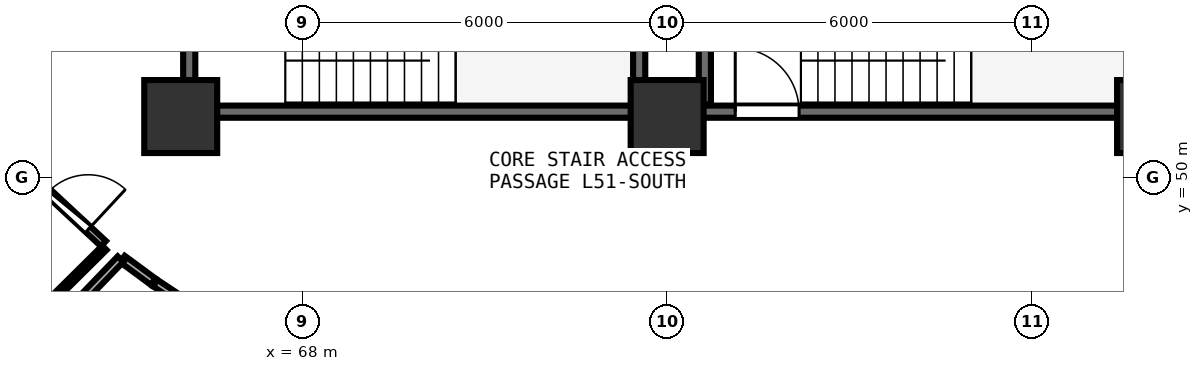
"""IFC4 building model, lengths in metres.
Left out: names, types, materials, properties, quantities, classifications, styles, units other than length and angle.
Written with IfcOpenShell. Run it as: python <this file> out.ifc"""

import sys

from ifc_helpers import new_model, si_unit, direction, frame, frame_2d, origin, origin_2d, place, context, subcontext, project, spatial, rectangle, extrude, element, fill, save


model = new_model("IFC4")
c1 = context("Model", 3, precision=1e-05, world=origin(), true_north=direction((0.0, 1.0)))
c2 = subcontext(c1, "Body", "Model", "MODEL_VIEW")
j1 = project(units=[si_unit("LENGTHUNIT", "METRE"), si_unit("PLANEANGLEUNIT", "RADIAN")], contexts=[c1])
p1 = place(None, origin())
s1 = spatial("IfcSite", under=j1, at=p1, CompositionType="ELEMENT")
p2 = place(p1, origin())
s2 = spatial("IfcBuilding", under=s1, at=p2, CompositionType="ELEMENT")
p3 = place(p2, frame((0.0, 0.0, 200.7)))
s3 = spatial("IfcBuildingStorey", under=s2, at=p3, CompositionType="ELEMENT", Elevation=200.7)
for number, where, z_axis, x_axis in (
    (1, (66.0, 51.0, 0.0), (0.0, 0.0, 1.0), (1.0, 0.0, 0.0)),
    (2, (74.0, 51.0, 0.0), (0.0, 0.0, 1.0), (1.0, 0.0, 0.0)),
    (3, (82.0, 51.0, 0.0), (0.0, 0.0, 1.0), (1.0, 0.0, 0.0)),
):
    element("IfcColumn", number, at=place(p3, frame(where, z_axis=z_axis, x_axis=x_axis)), inside=s3, PredefinedType="PILASTER", context=c2, shape_type="SweptSolid", body=[
        extrude(rectangle(XDim=1.2, YDim=1.2, at=origin_2d()), origin(), (0.0, 0.0, 1.0), 3.75),
    ])
p4 = place(p3, frame((74.0, 51.08, 0.0), z_axis=(0.0, 0.0, 1.0), x_axis=(1.0, 0.0, 0.0)))
e4 = element("IfcWall", 4, at=p4, inside=s3, PredefinedType="SHEAR", context=c2, shape_type="SweptSolid", body=[
    extrude(rectangle(XDim=7.9, YDim=0.2, at=frame_2d((3.95, 0.0))), origin(), (0.0, 0.0, 1.0), 3.49),
])
p5 = place(p4, frame((1.12, 0.0, 0.0)))
e5 = element("IfcOpeningElement", 5, at=p5, cuts=e4, PredefinedType="OPENING", context=c2, shape_type="SweptSolid", body=[
    extrude(rectangle(XDim=1.05, YDim=2.1, at=frame_2d((0.525, 1.05))), frame((0.0, 0.11, 0.0), z_axis=(0.0, -1.0, 0.0), x_axis=(1.0, 0.0, 0.0)), (0.0, 0.0, 1.0), 0.22),
])
p6 = place(p3, frame((74.62, 54.27, 0.0), z_axis=(0.0, 0.0, 1.0), x_axis=(0.0, -1.0, 0.0)))
e6 = element("IfcWall", 6, at=p6, inside=s3, PredefinedType="SHEAR", context=c2, shape_type="SweptSolid", body=[
    extrude(rectangle(XDim=3.07, YDim=0.2, at=frame_2d((1.535, 0.0))), origin(), (0.0, 0.0, 1.0), 3.49),
])
p7 = place(p3, frame((66.26, 51.08, 0.0), z_axis=(0.0, 0.0, 1.0), x_axis=(1.0, 0.0, 0.0)))
e7 = element("IfcWall", 7, at=p7, inside=s3, PredefinedType="SHEAR", context=c2, shape_type="SweptSolid", body=[
    extrude(rectangle(XDim=7.16, YDim=0.2, at=frame_2d((3.58, 0.0))), origin(), (0.0, 0.0, 1.0), 3.49),
])
p8 = place(p3, frame((73.54, 51.2, 0.0), z_axis=(0.0, 0.0, 1.0), x_axis=(0.0, 1.0, 0.0)))
e8 = element("IfcWall", 8, at=p8, inside=s3, PredefinedType="SHEAR", context=c2, shape_type="SweptSolid", body=[
    extrude(rectangle(XDim=3.07, YDim=0.2, at=frame_2d((1.535, 0.0))), origin(), (0.0, 0.0, 1.0), 3.49),
])
p9 = place(p3, frame((66.14, 54.27, 0.0), z_axis=(0.0, 0.0, 1.0), x_axis=(0.0, -1.0, 0.0)))
e9 = element("IfcWall", 9, at=p9, inside=s3, PredefinedType="SHEAR", context=c2, shape_type="SweptSolid", body=[
    extrude(rectangle(XDim=3.07, YDim=0.2, at=frame_2d((1.535, 0.0))), origin(), (0.0, 0.0, 1.0), 3.49),
])
p10 = place(p9, frame((1.01, 0.0, 0.0)))
e10 = element("IfcOpeningElement", 10, at=p10, cuts=e9, PredefinedType="OPENING", context=c2, shape_type="SweptSolid", body=[
    extrude(rectangle(XDim=1.05, YDim=2.1, at=frame_2d((0.525, 1.05))), frame((0.0, 0.11, 0.0), z_axis=(0.0, -1.0, 0.0), x_axis=(1.0, 0.0, 0.0)), (0.0, 0.0, 1.0), 0.22),
])
p11 = place(p3, frame((63.569, 49.988, 0.0), z_axis=(0.0, 0.0, 1.0), x_axis=(0.732453034456, -0.680817561698, 0.0)))
e11 = element("IfcWall", 11, at=p11, inside=s3, PredefinedType="PARTITIONING", context=c2, shape_type="SweptSolid", body=[
    extrude(rectangle(XDim=1.584, YDim=0.12, at=frame_2d((0.792, 0.0))), origin(), (0.0, 0.0, 1.0), 3.025),
])
p12 = place(p11, frame((0.342, 0.0, 0.0)))
e12 = element("IfcOpeningElement", 12, at=p12, cuts=e11, PredefinedType="OPENING", context=c2, shape_type="SweptSolid", body=[
    extrude(rectangle(XDim=0.9, YDim=2.08, at=frame_2d((0.45, 1.04))), frame((0.0, 0.07, 0.0), z_axis=(0.0, -1.0, 0.0), x_axis=(1.0, 0.0, 0.0)), (0.0, 0.0, 1.0), 0.14),
])
p13 = place(p3, frame((75.686, 45.773, 0.0), z_axis=(0.0, 0.0, 1.0), x_axis=(0.935263689731, 0.353951734945, 0.0)))
e13 = element("IfcWall", 13, at=p13, inside=s3, PredefinedType="PARTITIONING", context=c2, shape_type="SweptSolid", body=[
    extrude(rectangle(XDim=7.355, YDim=0.1, at=frame_2d((3.678, 0.0))), origin(), (0.0, 0.0, 1.0), 3.025),
])
p14 = place(p3, frame((64.745, 48.841, 0.0), z_axis=(0.0, 0.0, 1.0), x_axis=(-0.710363664194, -0.703834827635, 0.0)))
e14 = element("IfcWall", 14, at=p14, inside=s3, PredefinedType="PARTITIONING", context=c2, shape_type="SweptSolid", body=[
    extrude(rectangle(XDim=7.441, YDim=0.1, at=frame_2d((3.721, 0.0))), origin(), (0.0, 0.0, 1.0), 3.075),
])
p15 = place(p3, frame((65.04, 48.658, 0.0), z_axis=(0.0, 0.0, 1.0), x_axis=(0.804987739936, -0.593291444867, 0.0)))
e15 = element("IfcWall", 15, at=p15, inside=s3, PredefinedType="PLUMBINGWALL", context=c2, shape_type="SweptSolid", body=[
    extrude(rectangle(XDim=0.631, YDim=0.13, at=frame_2d((0.315, 0.0))), origin(), (0.0, 0.0, 1.0), 3.025),
])
p16 = place(p3, frame((65.581, 48.261, 0.0), z_axis=(0.0, 0.0, 1.0), x_axis=(0.83341242139, -0.55265155014, 0.0)))
e16 = element("IfcWall", 16, at=p16, inside=s3, PredefinedType="PLUMBINGWALL", context=c2, shape_type="SweptSolid", body=[
    extrude(rectangle(XDim=0.633, YDim=0.13, at=frame_2d((0.316, 0.0))), origin(), (0.0, 0.0, 1.0), 3.48),
])
p17 = place(p3, frame((62.465, 46.01, 0.0), z_axis=(0.0, 0.0, 1.0), x_axis=(0.693241598237, 0.720705270186, 0.0)))
e17 = element("IfcWall", 17, at=p17, inside=s3, PredefinedType="PLUMBINGWALL", context=c2, shape_type="SweptSolid", body=[
    extrude(rectangle(XDim=3.671, YDim=0.13, at=frame_2d((1.836, 0.0))), origin(), (0.0, 0.0, 1.0), 3.175),
])
p18 = place(p5, origin())
e18 = element("IfcDoor", 18, at=p18, inside=s3, OperationType="SINGLE_SWING_LEFT", PredefinedType="DOOR", context=c2, shape_type="SweptSolid", body=[
    extrude(rectangle(XDim=1.05, YDim=2.1, at=frame_2d((0.525, 1.05))), frame((0.0, 0.025, 0.0), z_axis=(0.0, -1.0, 0.0), x_axis=(1.0, 0.0, 0.0)), (0.0, 0.0, 1.0), 0.05),
])
fill(e5, e18)
p19 = place(p12, origin())
e19 = element("IfcDoor", 19, at=p19, inside=s3, OperationType="SINGLE_SWING_RIGHT", PredefinedType="DOOR", context=c2, shape_type="SweptSolid", body=[
    extrude(rectangle(XDim=0.9, YDim=2.08, at=frame_2d((0.45, 1.04))), frame((0.0, 0.025, 0.0), z_axis=(0.0, -1.0, 0.0), x_axis=(1.0, 0.0, 0.0)), (0.0, 0.0, 1.0), 0.05),
])
fill(e12, e19)
save(model, sys.argv[1])
